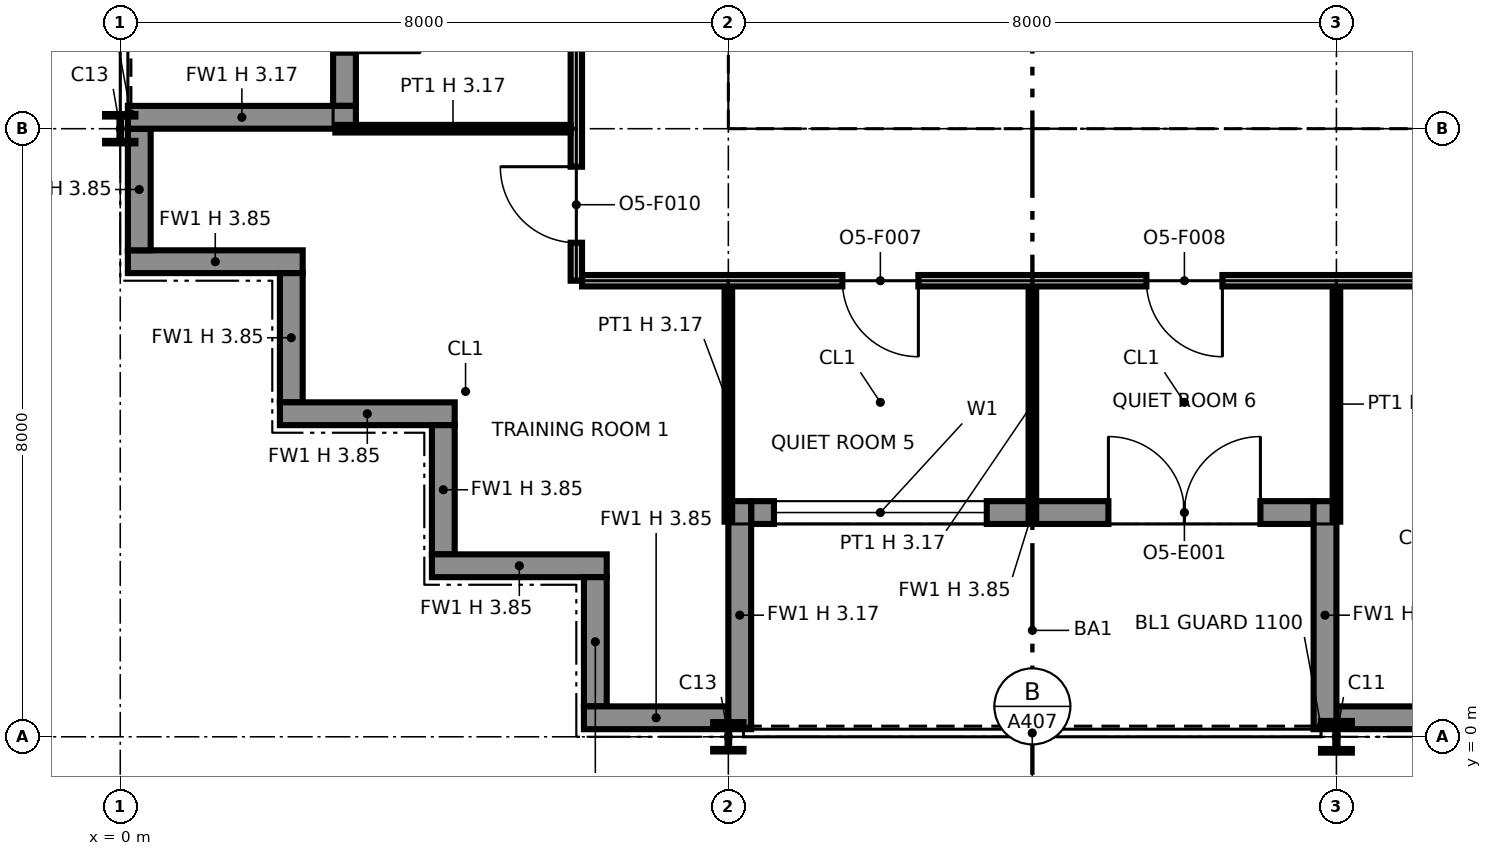
"""IFC4 building model, lengths in metres.
Left out: names, types, materials, properties, quantities, classifications, styles, units other than length and angle.
Written with IfcOpenShell. Run it as: python <this file> out.ifc"""

import sys

from ifc_helpers import new_model, si_unit, direction, frame, frame_2d, origin, origin_2d, place, context, subcontext, project, spatial, polyline, rectangle, i_section, outline, extrude, element, fill, save


model = new_model("IFC4")
c1 = context("Model", 3, precision=1e-05, world=origin(), true_north=direction((0.0, 1.0)))
c2 = subcontext(c1, "Body", "Model", "MODEL_VIEW")
j1 = project(units=[si_unit("LENGTHUNIT", "METRE"), si_unit("PLANEANGLEUNIT", "RADIAN")], contexts=[c1])
p1 = place(None, origin())
s1 = spatial("IfcSite", under=j1, at=p1, CompositionType="ELEMENT")
p2 = place(p1, origin())
s2 = spatial("IfcBuilding", under=s1, at=p2, CompositionType="ELEMENT")
p3 = place(p2, frame((0.0, 0.0, 225.0)))
s3 = spatial("IfcBuildingStorey", under=s2, at=p3, CompositionType="ELEMENT", Elevation=225.0)
for number, where, z_axis, x_axis in (
    (1, (0.0, 8.0, 0.0), (0.0, 0.0, 1.0), (1.0, 0.0, 0.0)),
    (2, (8.0, 0.0, 0.0), (0.0, 0.0, 1.0), (1.0, 0.0, 0.0)),
):
    element("IfcColumn", number, at=place(p3, frame(where, z_axis=z_axis, x_axis=x_axis)), inside=s3, PredefinedType="COLUMN", context=c2, shape_type="SweptSolid", body=[
        extrude(i_section(OverallWidth=0.399, OverallDepth=0.386, WebThickness=0.021, FlangeThickness=0.033, at=origin_2d()), origin(), (0.0, 0.0, 1.0), 3.85),
    ])
p4 = place(p3, frame((8.0, 8.0, 0.0), z_axis=(0.0, 0.0, 1.0), x_axis=(1.0, 0.0, 0.0)))
e3 = element("IfcColumn", 3, at=p4, inside=s3, PredefinedType="COLUMN", context=c2, shape_type="SweptSolid", body=[
    extrude(i_section(OverallWidth=0.373, OverallDepth=0.368, WebThickness=0.015, FlangeThickness=0.024, at=origin_2d()), origin(), (0.0, 0.0, 1.0), 3.85),
])
p5 = place(p3, frame((16.0, 0.0, 0.0), z_axis=(0.0, 0.0, 1.0), x_axis=(1.0, 0.0, 0.0)))
e4 = element("IfcColumn", 4, at=p5, inside=s3, PredefinedType="COLUMN", context=c2, shape_type="SweptSolid", body=[
    extrude(i_section(OverallWidth=0.406, OverallDepth=0.417, WebThickness=0.03, FlangeThickness=0.048, at=origin_2d()), origin(), (0.0, 0.0, 1.0), 3.85),
])
p6 = place(p3, frame((16.0, 8.0, 0.0), z_axis=(0.0, 0.0, 1.0), x_axis=(1.0, 0.0, 0.0)))
e5 = element("IfcColumn", 5, at=p6, inside=s3, PredefinedType="COLUMN", context=c2, shape_type="SweptSolid", body=[
    extrude(i_section(OverallWidth=0.373, OverallDepth=0.368, WebThickness=0.015, FlangeThickness=0.024, at=origin_2d()), origin(), (0.0, 0.0, 1.0), 3.85),
])
p7 = place(p3, frame((0.1, 6.25, 0.0), z_axis=(0.0, 0.0, 1.0), x_axis=(1.0, 0.0, 0.0)))
e6 = element("IfcWall", 6, at=p7, inside=s3, PredefinedType="SOLIDWALL", context=c2, shape_type="SweptSolid", body=[
    extrude(rectangle(XDim=2.3, YDim=0.3, at=frame_2d((1.15, 0.0))), origin(), (0.0, 0.0, 1.0), 3.85),
])
p8 = place(p3, frame((2.25, 6.1, 0.0), z_axis=(0.0, 0.0, 1.0), x_axis=(0.0, -1.0, 0.0)))
e7 = element("IfcWall", 7, at=p8, inside=s3, PredefinedType="SOLIDWALL", context=c2, shape_type="SweptSolid", body=[
    extrude(rectangle(XDim=1.7, YDim=0.3, at=frame_2d((0.85, 0.0))), origin(), (0.0, 0.0, 1.0), 3.85),
])
p9 = place(p3, frame((2.1, 4.25, 0.0), z_axis=(0.0, 0.0, 1.0), x_axis=(1.0, 0.0, 0.0)))
e8 = element("IfcWall", 8, at=p9, inside=s3, PredefinedType="SOLIDWALL", context=c2, shape_type="SweptSolid", body=[
    extrude(rectangle(XDim=2.3, YDim=0.3, at=frame_2d((1.15, 0.0))), origin(), (0.0, 0.0, 1.0), 3.85),
])
p10 = place(p3, frame((4.25, 4.1, 0.0), z_axis=(0.0, 0.0, 1.0), x_axis=(0.0, -1.0, 0.0)))
e9 = element("IfcWall", 9, at=p10, inside=s3, PredefinedType="SOLIDWALL", context=c2, shape_type="SweptSolid", body=[
    extrude(rectangle(XDim=1.7, YDim=0.3, at=frame_2d((0.85, 0.0))), origin(), (0.0, 0.0, 1.0), 3.85),
])
p11 = place(p3, frame((4.1, 2.25, 0.0), z_axis=(0.0, 0.0, 1.0), x_axis=(1.0, 0.0, 0.0)))
e10 = element("IfcWall", 10, at=p11, inside=s3, PredefinedType="SOLIDWALL", context=c2, shape_type="SweptSolid", body=[
    extrude(rectangle(XDim=2.3, YDim=0.3, at=frame_2d((1.15, 0.0))), origin(), (0.0, 0.0, 1.0), 3.85),
])
p12 = place(p3, frame((6.25, 2.1, 0.0), z_axis=(0.0, 0.0, 1.0), x_axis=(0.0, -1.0, 0.0)))
e11 = element("IfcWall", 11, at=p12, inside=s3, PredefinedType="SOLIDWALL", context=c2, shape_type="SweptSolid", body=[
    extrude(rectangle(XDim=1.7, YDim=0.3, at=frame_2d((0.85, 0.0))), origin(), (0.0, 0.0, 1.0), 3.85),
])
p13 = place(p3, frame((6.1, 0.25, 0.0), z_axis=(0.0, 0.0, 1.0), x_axis=(1.0, 0.0, 0.0)))
e12 = element("IfcWall", 12, at=p13, inside=s3, PredefinedType="SOLIDWALL", context=c2, shape_type="SweptSolid", body=[
    extrude(rectangle(XDim=1.9, YDim=0.3, at=frame_2d((0.95, 0.0))), origin(), (0.0, 0.0, 1.0), 3.85),
])
p14 = place(p3, frame((8.3, 2.95, 0.0), z_axis=(0.0, 0.0, 1.0), x_axis=(1.0, 0.0, 0.0)))
e13 = element("IfcWall", 13, at=p14, inside=s3, PredefinedType="SOLIDWALL", context=c2, shape_type="SweptSolid", body=[
    extrude(rectangle(XDim=7.4, YDim=0.3, at=frame_2d((3.7, 0.0))), origin(), (0.0, 0.0, 1.0), 3.85),
])
p15 = place(p14, frame((0.3, 0.0, 0.9)))
e14 = element("IfcOpeningElement", 14, at=p15, cuts=e13, PredefinedType="OPENING", context=c2, shape_type="SweptSolid", body=[
    extrude(rectangle(XDim=2.8, YDim=2.2, at=frame_2d((1.4, 1.1))), frame((0.0, 0.16, 0.0), z_axis=(0.0, -1.0, 0.0), x_axis=(1.0, 0.0, 0.0)), (0.0, 0.0, 1.0), 0.32),
])
p16 = place(p14, frame((4.7, 0.0, 0.0)))
e15 = element("IfcOpeningElement", 15, at=p16, cuts=e13, PredefinedType="OPENING", context=c2, shape_type="SweptSolid", body=[
    extrude(rectangle(XDim=2.0, YDim=2.4, at=frame_2d((1.0, 1.2))), frame((0.0, 0.16, 0.0), z_axis=(0.0, -1.0, 0.0), x_axis=(1.0, 0.0, 0.0)), (0.0, 0.0, 1.0), 0.32),
])
p17 = place(p3, frame((8.15, 0.1, 0.0), z_axis=(0.0, 0.0, 1.0), x_axis=(0.0, 1.0, 0.0)))
e16 = element("IfcWall", 16, at=p17, inside=s3, PredefinedType="SOLIDWALL", context=c2, shape_type="SweptSolid", body=[
    extrude(rectangle(XDim=3.0, YDim=0.3, at=frame_2d((1.5, 0.0))), origin(), (0.0, 0.0, 1.0), 3.171),
])
p18 = place(p3, frame((15.85, 0.1, 0.0), z_axis=(0.0, 0.0, 1.0), x_axis=(0.0, 1.0, 0.0)))
e17 = element("IfcWall", 17, at=p18, inside=s3, PredefinedType="SOLIDWALL", context=c2, shape_type="SweptSolid", body=[
    extrude(rectangle(XDim=3.0, YDim=0.3, at=frame_2d((1.5, 0.0))), origin(), (0.0, 0.0, 1.0), 3.237),
])
p19 = place(p3, frame((16.0, 0.25, 0.0), z_axis=(0.0, 0.0, 1.0), x_axis=(1.0, 0.0, 0.0)))
e18 = element("IfcWall", 18, at=p19, inside=s3, PredefinedType="SOLIDWALL", context=c2, shape_type="SweptSolid", body=[
    extrude(rectangle(XDim=8.0, YDim=0.3, at=frame_2d((4.0, 0.0))), origin(), (0.0, 0.0, 1.0), 3.85),
])
p20 = place(p3, frame((2.95, 15.7, 0.0), z_axis=(0.0, 0.0, 1.0), x_axis=(0.0, -1.0, 0.0)))
e19 = element("IfcWall", 19, at=p20, inside=s3, PredefinedType="SOLIDWALL", context=c2, shape_type="SweptSolid", body=[
    extrude(rectangle(XDim=7.4, YDim=0.3, at=frame_2d((3.7, 0.0))), origin(), (0.0, 0.0, 1.0), 3.85),
])
p21 = place(p20, frame((0.3, 0.0, 0.9)))
e20 = element("IfcOpeningElement", 20, at=p21, cuts=e19, PredefinedType="OPENING", context=c2, shape_type="SweptSolid", body=[
    extrude(rectangle(XDim=2.8, YDim=2.2, at=frame_2d((1.4, 1.1))), frame((0.0, 0.16, 0.0), z_axis=(0.0, -1.0, 0.0), x_axis=(1.0, 0.0, 0.0)), (0.0, 0.0, 1.0), 0.32),
])
p22 = place(p20, frame((4.7, 0.0, 0.0)))
e21 = element("IfcOpeningElement", 21, at=p22, cuts=e19, PredefinedType="OPENING", context=c2, shape_type="SweptSolid", body=[
    extrude(rectangle(XDim=2.0, YDim=2.4, at=frame_2d((1.0, 1.2))), frame((0.0, 0.16, 0.0), z_axis=(0.0, -1.0, 0.0), x_axis=(1.0, 0.0, 0.0)), (0.0, 0.0, 1.0), 0.32),
])
p23 = place(p3, frame((0.1, 8.15, 0.0), z_axis=(0.0, 0.0, 1.0), x_axis=(1.0, 0.0, 0.0)))
e22 = element("IfcWall", 22, at=p23, inside=s3, PredefinedType="SOLIDWALL", context=c2, shape_type="SweptSolid", body=[
    extrude(rectangle(XDim=3.0, YDim=0.3, at=frame_2d((1.5, 0.0))), origin(), (0.0, 0.0, 1.0), 3.171),
])
p24 = place(p3, frame((0.25, 8.0, 0.0), z_axis=(0.0, 0.0, 1.0), x_axis=(0.0, -1.0, 0.0)))
e23 = element("IfcWall", 23, at=p24, inside=s3, PredefinedType="SOLIDWALL", context=c2, shape_type="SweptSolid", body=[
    extrude(rectangle(XDim=1.6, YDim=0.3, at=frame_2d((0.8, 0.0))), origin(), (0.0, 0.0, 1.0), 3.85),
])
p25 = place(p3, frame((8.65, 8.75, 0.0), z_axis=(0.0, 0.0, 1.0), x_axis=(1.0, 0.0, 0.0)))
e24 = element("IfcWall", 24, at=p25, inside=s3, PredefinedType="PARTITIONING", context=c2, shape_type="SweptSolid", body=[
    extrude(outline(polyline([(0.0, 0.0), (14.7, 0.0), (14.7, 3.85), (7.438, 3.85), (7.438, 3.308), (7.262, 3.308), (7.261, 3.85), (0.0, 3.85), (0.0, 0.0)])), frame((0.0, 0.1, 0.0), z_axis=(0.0, -1.0, 0.0), x_axis=(1.0, 0.0, 0.0)), (0.0, 0.0, 1.0), 0.2),
])
p26 = place(p25, frame((1.3, 0.0, 0.0)))
e25 = element("IfcOpeningElement", 25, at=p26, cuts=e24, PredefinedType="OPENING", context=c2, shape_type="SweptSolid", body=[
    extrude(rectangle(XDim=1.4, YDim=2.1, at=frame_2d((0.7, 1.05))), frame((0.0, 0.11, 0.0), z_axis=(0.0, -1.0, 0.0), x_axis=(1.0, 0.0, 0.0)), (0.0, 0.0, 1.0), 0.22),
])
p27 = place(p25, frame((4.6, 0.0, 0.0)))
e26 = element("IfcOpeningElement", 26, at=p27, cuts=e24, PredefinedType="OPENING", context=c2, shape_type="SweptSolid", body=[
    extrude(rectangle(XDim=1.4, YDim=2.1, at=frame_2d((0.7, 1.05))), frame((0.0, 0.11, 0.0), z_axis=(0.0, -1.0, 0.0), x_axis=(1.0, 0.0, 0.0)), (0.0, 0.0, 1.0), 0.22),
])
p28 = place(p25, frame((10.4, 0.0, 0.0)))
e27 = element("IfcOpeningElement", 27, at=p28, cuts=e24, PredefinedType="OPENING", context=c2, shape_type="SweptSolid", body=[
    extrude(rectangle(XDim=1.2, YDim=2.1, at=frame_2d((0.6, 1.05))), frame((0.0, 0.11, 0.0), z_axis=(0.0, -1.0, 0.0), x_axis=(1.0, 0.0, 0.0)), (0.0, 0.0, 1.0), 0.22),
])
p29 = place(p3, frame((8.75, 8.85, 0.0), z_axis=(0.0, 0.0, 1.0), x_axis=(0.0, 1.0, 0.0)))
e28 = element("IfcWall", 28, at=p29, inside=s3, PredefinedType="PARTITIONING", context=c2, shape_type="SweptSolid", body=[
    extrude(outline(polyline([(0.0, 0.0), (14.3, 0.0), (14.3, 3.85), (10.225, 3.85), (10.224, 3.44), (10.076, 3.44), (10.075, 3.85), (7.239, 3.85), (7.238, 3.308), (7.062, 3.308), (7.062, 3.85), (0.0, 3.85), (0.0, 0.0)])), frame((0.0, 0.1, 0.0), z_axis=(0.0, -1.0, 0.0), x_axis=(1.0, 0.0, 0.0)), (0.0, 0.0, 1.0), 0.2),
])
p30 = place(p29, frame((8.3, 0.0, 0.0)))
e29 = element("IfcOpeningElement", 29, at=p30, cuts=e28, PredefinedType="OPENING", context=c2, shape_type="SweptSolid", body=[
    extrude(rectangle(XDim=1.8, YDim=2.1, at=frame_2d((0.9, 1.05))), frame((0.0, 0.11, 0.0), z_axis=(0.0, -1.0, 0.0), x_axis=(1.0, 0.0, 0.0)), (0.0, 0.0, 1.0), 0.22),
])
p31 = place(p3, frame((12.4, 8.85, 0.0), z_axis=(0.0, 0.0, 1.0), x_axis=(0.0, 1.0, 0.0)))
e30 = element("IfcWall", 30, at=p31, inside=s3, PredefinedType="PARTITIONING", context=c2, shape_type="SweptSolid", body=[
    extrude(rectangle(XDim=6.85, YDim=0.2, at=frame_2d((3.425, 0.0))), origin(), (0.0, 0.0, 1.0), 3.85),
])
p32 = place(p3, frame((15.85, 8.85, 0.0), z_axis=(0.0, 0.0, 1.0), x_axis=(0.0, 1.0, 0.0)))
e31 = element("IfcWall", 31, at=p32, inside=s3, PredefinedType="PARTITIONING", context=c2, shape_type="SweptSolid", body=[
    extrude(rectangle(XDim=1.55, YDim=0.9, at=frame_2d((0.775, 0.0))), origin(), (0.0, 0.0, 1.0), 3.308),
])
p33 = place(p32, frame((0.3, 0.0, 0.0)))
e32 = element("IfcOpeningElement", 32, at=p33, cuts=e31, PredefinedType="OPENING", context=c2, shape_type="SweptSolid", body=[
    extrude(rectangle(XDim=1.1, YDim=2.1, at=frame_2d((0.55, 1.05))), frame((0.0, 0.46, 0.0), z_axis=(0.0, -1.0, 0.0), x_axis=(1.0, 0.0, 0.0)), (0.0, 0.0, 1.0), 0.92),
])
for number, where, z_axis, x_axis in (
    (33, (8.0, 2.83, 0.0), (0.0, 0.0, 1.0), (0.0, 1.0, 0.0)),
    (34, (12.0, 2.83, 0.0), (0.0, 0.0, 1.0), (0.0, 1.0, 0.0)),
    (35, (16.0, 2.83, 0.0), (0.0, 0.0, 1.0), (0.0, 1.0, 0.0)),
):
    element("IfcWall", number, at=place(p3, frame(where, z_axis=z_axis, x_axis=x_axis)), inside=s3, PredefinedType="PARTITIONING", context=c2, shape_type="SweptSolid", body=[
        extrude(rectangle(XDim=3.095, YDim=0.1, at=frame_2d((1.547, 0.0))), origin(), (0.0, 0.0, 1.0), 3.172),
    ])
p34 = place(p3, frame((6.075, 6.0, 0.0), z_axis=(0.0, 0.0, 1.0), x_axis=(1.0, 0.0, 0.0)))
e36 = element("IfcWall", 36, at=p34, inside=s3, PredefinedType="PARTITIONING", context=c2, shape_type="SweptSolid", body=[
    extrude(rectangle(XDim=35.85, YDim=0.15, at=frame_2d((17.925, 0.0))), origin(), (0.0, 0.0, 1.0), 3.85),
])
p35 = place(p34, frame((12.425, 0.0, 0.0), z_axis=(0.0, 0.0, 1.0), x_axis=(-1.0, 0.0, 0.0)))
e37 = element("IfcOpeningElement", 37, at=p35, cuts=e36, PredefinedType="OPENING", context=c2, shape_type="SweptSolid", body=[
    extrude(rectangle(XDim=1.0, YDim=2.1, at=frame_2d((0.5, 1.05))), frame((0.0, 0.085, 0.0), z_axis=(0.0, -1.0, 0.0), x_axis=(1.0, 0.0, 0.0)), (0.0, 0.0, 1.0), 0.17),
])
p36 = place(p34, frame((16.425, 0.0, 0.0), z_axis=(0.0, 0.0, 1.0), x_axis=(-1.0, 0.0, 0.0)))
e38 = element("IfcOpeningElement", 38, at=p36, cuts=e36, PredefinedType="OPENING", context=c2, shape_type="SweptSolid", body=[
    extrude(rectangle(XDim=1.0, YDim=2.1, at=frame_2d((0.5, 1.05))), frame((0.0, 0.085, 0.0), z_axis=(0.0, -1.0, 0.0), x_axis=(1.0, 0.0, 0.0)), (0.0, 0.0, 1.0), 0.17),
])
p37 = place(p34, frame((28.425, 0.0, 0.0), z_axis=(0.0, 0.0, 1.0), x_axis=(-1.0, 0.0, 0.0)))
e39 = element("IfcOpeningElement", 39, at=p37, cuts=e36, PredefinedType="OPENING", context=c2, shape_type="SweptSolid", body=[
    extrude(rectangle(XDim=1.0, YDim=2.1, at=frame_2d((0.5, 1.05))), frame((0.0, 0.085, 0.0), z_axis=(0.0, -1.0, 0.0), x_axis=(1.0, 0.0, 0.0)), (0.0, 0.0, 1.0), 0.17),
])
p38 = place(p34, frame((32.425, 0.0, 0.0), z_axis=(0.0, 0.0, 1.0), x_axis=(-1.0, 0.0, 0.0)))
e40 = element("IfcOpeningElement", 40, at=p38, cuts=e36, PredefinedType="OPENING", context=c2, shape_type="SweptSolid", body=[
    extrude(rectangle(XDim=1.0, YDim=2.1, at=frame_2d((0.5, 1.05))), frame((0.0, 0.085, 0.0), z_axis=(0.0, -1.0, 0.0), x_axis=(1.0, 0.0, 0.0)), (0.0, 0.0, 1.0), 0.17),
])
p39 = place(p34, frame((4.425, 0.0, 0.0), z_axis=(0.0, 0.0, 1.0), x_axis=(-1.0, 0.0, 0.0)))
e41 = element("IfcOpeningElement", 41, at=p39, cuts=e36, PredefinedType="OPENING", context=c2, shape_type="SweptSolid", body=[
    extrude(rectangle(XDim=1.0, YDim=2.1, at=frame_2d((0.5, 1.05))), frame((0.0, 0.085, 0.0), z_axis=(0.0, -1.0, 0.0), x_axis=(1.0, 0.0, 0.0)), (0.0, 0.0, 1.0), 0.17),
])
p40 = place(p34, frame((8.425, 0.0, 0.0), z_axis=(0.0, 0.0, 1.0), x_axis=(-1.0, 0.0, 0.0)))
e42 = element("IfcOpeningElement", 42, at=p40, cuts=e36, PredefinedType="OPENING", context=c2, shape_type="SweptSolid", body=[
    extrude(rectangle(XDim=1.0, YDim=2.1, at=frame_2d((0.5, 1.05))), frame((0.0, 0.085, 0.0), z_axis=(0.0, -1.0, 0.0), x_axis=(1.0, 0.0, 0.0)), (0.0, 0.0, 1.0), 0.17),
])
p41 = place(p34, frame((23.425, 0.0, 0.0), z_axis=(0.0, 0.0, 1.0), x_axis=(-1.0, 0.0, 0.0)))
e43 = element("IfcOpeningElement", 43, at=p41, cuts=e36, PredefinedType="OPENING", context=c2, shape_type="SweptSolid", body=[
    extrude(rectangle(XDim=1.0, YDim=2.1, at=frame_2d((0.5, 1.05))), frame((0.0, 0.085, 0.0), z_axis=(0.0, -1.0, 0.0), x_axis=(1.0, 0.0, 0.0)), (0.0, 0.0, 1.0), 0.17),
])
p42 = place(p34, frame((35.425, 0.0, 0.0), z_axis=(0.0, 0.0, 1.0), x_axis=(-1.0, 0.0, 0.0)))
e44 = element("IfcOpeningElement", 44, at=p42, cuts=e36, PredefinedType="OPENING", context=c2, shape_type="SweptSolid", body=[
    extrude(rectangle(XDim=1.0, YDim=2.1, at=frame_2d((0.5, 1.05))), frame((0.0, 0.085, 0.0), z_axis=(0.0, -1.0, 0.0), x_axis=(1.0, 0.0, 0.0)), (0.0, 0.0, 1.0), 0.17),
])
p43 = place(p3, frame((6.0, 6.0, 0.0), z_axis=(0.0, 0.0, 1.0), x_axis=(0.0, 1.0, 0.0)))
e45 = element("IfcWall", 45, at=p43, inside=s3, PredefinedType="PARTITIONING", context=c2, shape_type="SweptSolid", body=[
    extrude(outline(polyline([(0.0, 0.0), (13.375, 0.0), (13.375, 3.85), (10.3, 3.85), (10.298, 3.172), (9.702, 3.172), (9.7, 3.85), (6.3, 3.85), (6.298, 3.172), (5.702, 3.172), (5.7, 3.85), (2.3, 3.85), (2.298, 3.172), (1.702, 3.172), (1.7, 3.85), (0.0, 3.85), (0.0, 0.0)])), frame((0.0, 0.075, 0.0), z_axis=(0.0, -1.0, 0.0), x_axis=(1.0, 0.0, 0.0)), (0.0, 0.0, 1.0), 0.15),
])
p44 = place(p43, frame((0.5, 0.0, 0.0)))
e46 = element("IfcOpeningElement", 46, at=p44, cuts=e45, PredefinedType="OPENING", context=c2, shape_type="SweptSolid", body=[
    extrude(rectangle(XDim=1.0, YDim=2.1, at=frame_2d((0.5, 1.05))), frame((0.0, 0.085, 0.0), z_axis=(0.0, -1.0, 0.0), x_axis=(1.0, 0.0, 0.0)), (0.0, 0.0, 1.0), 0.17),
])
p45 = place(p43, frame((5.5, 0.0, 0.0)))
e47 = element("IfcOpeningElement", 47, at=p45, cuts=e45, PredefinedType="OPENING", context=c2, shape_type="SweptSolid", body=[
    extrude(rectangle(XDim=1.0, YDim=2.1, at=frame_2d((0.5, 1.05))), frame((0.0, 0.085, 0.0), z_axis=(0.0, -1.0, 0.0), x_axis=(1.0, 0.0, 0.0)), (0.0, 0.0, 1.0), 0.17),
])
p46 = place(p43, frame((11.225, 0.0, 0.0)))
e48 = element("IfcOpeningElement", 48, at=p46, cuts=e45, PredefinedType="OPENING", context=c2, shape_type="SweptSolid", body=[
    extrude(rectangle(XDim=1.0, YDim=2.1, at=frame_2d((0.5, 1.05))), frame((0.0, 0.085, 0.0), z_axis=(0.0, -1.0, 0.0), x_axis=(1.0, 0.0, 0.0)), (0.0, 0.0, 1.0), 0.17),
])
p47 = place(p3, frame((2.83, 8.0, 0.0), z_axis=(0.0, 0.0, 1.0), x_axis=(1.0, 0.0, 0.0)))
e49 = element("IfcWall", 49, at=p47, inside=s3, PredefinedType="PARTITIONING", context=c2, shape_type="SweptSolid", body=[
    extrude(rectangle(XDim=3.095, YDim=0.1, at=frame_2d((1.547, 0.0))), origin(), (0.0, 0.0, 1.0), 3.172),
])
p48 = place(p15, origin())
e50 = element("IfcWindow", 50, at=p48, inside=s3, PartitioningType="SINGLE_PANEL", PredefinedType="WINDOW", context=c2, shape_type="SweptSolid", body=[
    extrude(rectangle(XDim=2.8, YDim=2.2, at=frame_2d((1.4, 1.1))), frame((0.0, 0.03, 0.0), z_axis=(0.0, -1.0, 0.0), x_axis=(1.0, 0.0, 0.0)), (0.0, 0.0, 1.0), 0.06),
])
fill(e14, e50)
p49 = place(p16, origin())
e51 = element("IfcDoor", 51, at=p49, inside=s3, OperationType="DOUBLE_DOOR_SINGLE_SWING", PredefinedType="DOOR", context=c2, shape_type="SweptSolid", body=[
    extrude(rectangle(XDim=2.0, YDim=2.4, at=frame_2d((1.0, 1.2))), frame((0.0, 0.025, 0.0), z_axis=(0.0, -1.0, 0.0), x_axis=(1.0, 0.0, 0.0)), (0.0, 0.0, 1.0), 0.05),
])
fill(e15, e51)
p50 = place(p26, origin())
e52 = element("IfcDoor", 52, at=p50, inside=s3, OperationType="DOUBLE_DOOR_SINGLE_SWING", PredefinedType="NOTDEFINED", context=c2, shape_type="SweptSolid", body=[
    extrude(rectangle(XDim=1.4, YDim=2.1, at=frame_2d((0.7, 1.05))), frame((0.0, 0.025, 0.0), z_axis=(0.0, -1.0, 0.0), x_axis=(1.0, 0.0, 0.0)), (0.0, 0.0, 1.0), 0.05),
])
fill(e25, e52)
p51 = place(p27, origin())
e53 = element("IfcDoor", 53, at=p51, inside=s3, OperationType="DOUBLE_DOOR_SINGLE_SWING", PredefinedType="NOTDEFINED", context=c2, shape_type="SweptSolid", body=[
    extrude(rectangle(XDim=1.4, YDim=2.1, at=frame_2d((0.7, 1.05))), frame((0.0, 0.025, 0.0), z_axis=(0.0, -1.0, 0.0), x_axis=(1.0, 0.0, 0.0)), (0.0, 0.0, 1.0), 0.05),
])
fill(e26, e53)
p52 = place(p39, origin())
e54 = element("IfcDoor", 54, at=p52, inside=s3, OperationType="SINGLE_SWING_LEFT", PredefinedType="DOOR", context=c2, shape_type="SweptSolid", body=[
    extrude(rectangle(XDim=1.0, YDim=2.1, at=frame_2d((0.5, 1.05))), frame((0.0, 0.025, 0.0), z_axis=(0.0, -1.0, 0.0), x_axis=(1.0, 0.0, 0.0)), (0.0, 0.0, 1.0), 0.05),
])
fill(e41, e54)
p53 = place(p40, origin())
e55 = element("IfcDoor", 55, at=p53, inside=s3, OperationType="SINGLE_SWING_LEFT", PredefinedType="DOOR", context=c2, shape_type="SweptSolid", body=[
    extrude(rectangle(XDim=1.0, YDim=2.1, at=frame_2d((0.5, 1.05))), frame((0.0, 0.025, 0.0), z_axis=(0.0, -1.0, 0.0), x_axis=(1.0, 0.0, 0.0)), (0.0, 0.0, 1.0), 0.05),
])
fill(e42, e55)
p54 = place(p44, origin())
e56 = element("IfcDoor", 56, at=p54, inside=s3, OperationType="SINGLE_SWING_RIGHT", PredefinedType="DOOR", context=c2, shape_type="SweptSolid", body=[
    extrude(rectangle(XDim=1.0, YDim=2.1, at=frame_2d((0.5, 1.05))), frame((0.0, 0.025, 0.0), z_axis=(0.0, -1.0, 0.0), x_axis=(1.0, 0.0, 0.0)), (0.0, 0.0, 1.0), 0.05),
])
fill(e46, e56)
save(model, sys.argv[1])
